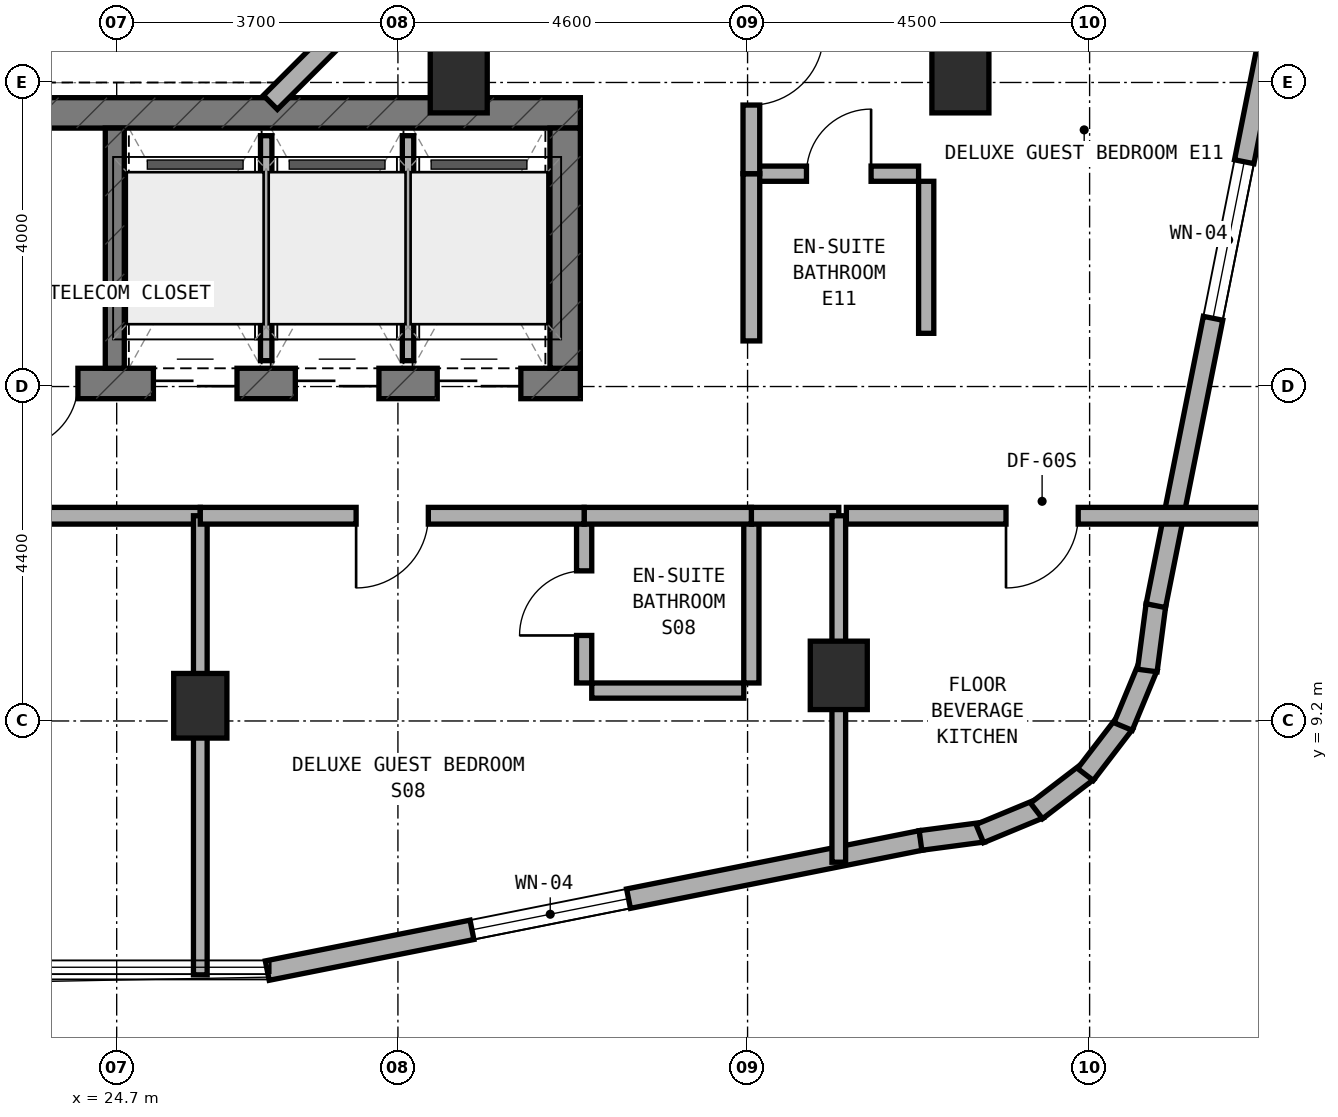
"""IFC4 building model, lengths in metres.
Left out: names, types, materials, properties, quantities, classifications, styles, units other than length and angle.
Written with IfcOpenShell. Run it as: python <this file> out.ifc"""

import sys

from ifc_helpers import new_model, si_unit, direction, frame, frame_2d, origin, origin_2d, place, context, subcontext, project, spatial, rectangle, extrude, element, fill, save


model = new_model("IFC4")
c1 = context("Model", 3, precision=1e-05, world=origin(), true_north=direction((0.0, 1.0)))
c2 = subcontext(c1, "Body", "Model", "MODEL_VIEW")
j1 = project(units=[si_unit("LENGTHUNIT", "METRE"), si_unit("PLANEANGLEUNIT", "RADIAN")], contexts=[c1])
p1 = place(None, origin())
s1 = spatial("IfcSite", under=j1, at=p1, CompositionType="ELEMENT")
p2 = place(p1, origin())
s2 = spatial("IfcBuilding", under=s1, at=p2, CompositionType="ELEMENT")
p3 = place(p2, frame((0.0, 0.0, 224.3)))
s3 = spatial("IfcBuildingStorey", under=s2, at=p3, CompositionType="ELEMENT", Elevation=224.3)
p4 = place(p3, frame((6.4, 13.64, 0.0), z_axis=(0.0, 0.0, 1.0), x_axis=(1.0, 0.0, 0.0)))
e1 = element("IfcWall", 1, at=p4, inside=s3, PredefinedType="SHEAR", context=c2, shape_type="SweptSolid", body=[
    extrude(rectangle(XDim=24.4, YDim=0.4, at=frame_2d((12.2, 0.0))), origin(), (0.0, 0.0, 1.0), 3.6),
])
p5 = place(p4, frame((9.15, 0.0, 0.0)))
e2 = element("IfcOpeningElement", 2, at=p5, cuts=e1, PredefinedType="OPENING", context=c2, shape_type="SweptSolid", body=[
    extrude(rectangle(XDim=1.2, YDim=2.15, at=frame_2d((0.6, 1.075))), frame((0.0, 0.21, 0.0), z_axis=(0.0, -1.0, 0.0), x_axis=(1.0, 0.0, 0.0)), (0.0, 0.0, 1.0), 0.42),
])
p6 = place(p4, frame((16.94, 0.0, 0.0)))
e3 = element("IfcOpeningElement", 3, at=p6, cuts=e1, PredefinedType="OPENING", context=c2, shape_type="SweptSolid", body=[
    extrude(rectangle(XDim=0.85, YDim=2.1, at=frame_2d((0.425, 1.05))), frame((0.0, 0.21, 0.0), z_axis=(0.0, -1.0, 0.0), x_axis=(1.0, 0.0, 0.0)), (0.0, 0.0, 1.0), 0.42),
])
p7 = place(p4, frame((18.783, 0.0, 0.0)))
e4 = element("IfcOpeningElement", 4, at=p7, cuts=e1, PredefinedType="OPENING", context=c2, shape_type="SweptSolid", body=[
    extrude(rectangle(XDim=1.1, YDim=2.15, at=frame_2d((0.55, 1.075))), frame((0.0, 0.21, 0.0), z_axis=(0.0, -1.0, 0.0), x_axis=(1.0, 0.0, 0.0)), (0.0, 0.0, 1.0), 0.42),
])
p8 = place(p4, frame((20.65, 0.0, 0.0)))
e5 = element("IfcOpeningElement", 5, at=p8, cuts=e1, PredefinedType="OPENING", context=c2, shape_type="SweptSolid", body=[
    extrude(rectangle(XDim=1.1, YDim=2.15, at=frame_2d((0.55, 1.075))), frame((0.0, 0.21, 0.0), z_axis=(0.0, -1.0, 0.0), x_axis=(1.0, 0.0, 0.0)), (0.0, 0.0, 1.0), 0.42),
])
p9 = place(p4, frame((22.517, 0.0, 0.0)))
e6 = element("IfcOpeningElement", 6, at=p9, cuts=e1, PredefinedType="OPENING", context=c2, shape_type="SweptSolid", body=[
    extrude(rectangle(XDim=1.1, YDim=2.15, at=frame_2d((0.55, 1.075))), frame((0.0, 0.21, 0.0), z_axis=(0.0, -1.0, 0.0), x_axis=(1.0, 0.0, 0.0)), (0.0, 0.0, 1.0), 0.42),
])
p10 = place(p3, frame((6.4, 17.2, 0.0), z_axis=(0.0, 0.0, 1.0), x_axis=(1.0, 0.0, 0.0)))
e7 = element("IfcWall", 7, at=p10, inside=s3, PredefinedType="SHEAR", context=c2, shape_type="SweptSolid", body=[
    extrude(rectangle(XDim=24.4, YDim=0.4, at=frame_2d((12.2, 0.0))), origin(), (0.0, 0.0, 1.0), 3.6),
])
p11 = place(p3, frame((30.6, 13.84, 0.0), z_axis=(0.0, 0.0, 1.0), x_axis=(0.0, 1.0, 0.0)))
e8 = element("IfcWall", 8, at=p11, inside=s3, PredefinedType="SHEAR", context=c2, shape_type="SweptSolid", body=[
    extrude(rectangle(XDim=3.16, YDim=0.4, at=frame_2d((1.58, 0.0))), origin(), (0.0, 0.0, 1.0), 3.6),
])
p12 = place(p3, frame((24.675, 13.84, 0.0), z_axis=(0.0, 0.0, 1.0), x_axis=(0.0, 1.0, 0.0)))
e9 = element("IfcWall", 9, at=p12, inside=s3, PredefinedType="STANDARD", context=c2, shape_type="SweptSolid", body=[
    extrude(rectangle(XDim=3.16, YDim=0.25, at=frame_2d((1.58, 0.0))), origin(), (0.0, 0.0, 1.0), 3.32),
])
p13 = place(p3, frame((25.8, 9.4, 0.0), z_axis=(0.0, 0.0, 1.0), x_axis=(1.0, 0.0, 0.0)))
e10 = element("IfcColumn", 10, at=p13, inside=s3, PredefinedType="COLUMN", context=c2, shape_type="SweptSolid", body=[
    extrude(rectangle(XDim=0.7, YDim=0.85, at=origin_2d()), origin(), (0.0, 0.0, 1.0), 3.6),
])
for number, where, z_axis, x_axis in (
    (11, (34.2, 9.8, 0.0), (0.0, 0.0, 1.0), (1.0, 0.0, 0.0)),
    (12, (35.8, 17.65, 0.0), (0.0, 0.0, 1.0), (1.0, 0.0, 0.0)),
    (13, (29.2, 17.65, 0.0), (0.0, 0.0, 1.0), (1.0, 0.0, 0.0)),
):
    element("IfcColumn", number, at=place(p3, frame(where, z_axis=z_axis, x_axis=x_axis)), inside=s3, PredefinedType="COLUMN", context=c2, shape_type="SweptSolid", body=[
        extrude(rectangle(XDim=0.75, YDim=0.9, at=origin_2d()), origin(), (0.0, 0.0, 1.0), 3.6),
    ])
p14 = place(p3, frame((26.681, 5.916, 0.0), z_axis=(0.0, 0.0, 1.0), x_axis=(0.980745199176, 0.195291715883, 0.0)))
e14 = element("IfcWall", 14, at=p14, inside=s3, PredefinedType="STANDARD", context=c2, shape_type="SweptSolid", body=[
    extrude(rectangle(XDim=8.771, YDim=0.26, at=frame_2d((4.385, 0.0))), origin(), (0.0, 0.0, 1.0), 3.32),
])
p15 = place(p14, frame((2.746, 0.0, 0.85)))
e15 = element("IfcOpeningElement", 15, at=p15, cuts=e14, PredefinedType="OPENING", context=c2, shape_type="SweptSolid", body=[
    extrude(rectangle(XDim=2.1, YDim=1.5, at=frame_2d((1.05, 0.75))), frame((0.0, 0.14, 0.0), z_axis=(0.0, -1.0, 0.0), x_axis=(1.0, 0.0, 0.0)), (0.0, 0.0, 1.0), 0.28),
])
p16 = place(p3, frame((35.275, 7.628, 0.0), z_axis=(0.0, 0.0, 1.0), x_axis=(0.9913883573, 0.130954667764, 0.0)))
e16 = element("IfcWall", 16, at=p16, inside=s3, PredefinedType="STANDARD", context=c2, shape_type="SweptSolid", body=[
    extrude(rectangle(XDim=0.833, YDim=0.26, at=frame_2d((0.417, 0.0))), origin(), (0.0, 0.0, 1.0), 3.32),
])
p17 = place(p3, frame((36.055, 7.719, 0.0), z_axis=(0.0, 0.0, 1.0), x_axis=(0.923754491172, 0.382985169477, 0.0)))
e17 = element("IfcWall", 17, at=p17, inside=s3, PredefinedType="STANDARD", context=c2, shape_type="SweptSolid", body=[
    extrude(rectangle(XDim=0.851, YDim=0.26, at=frame_2d((0.426, 0.0))), origin(), (0.0, 0.0, 1.0), 3.32),
])
for number, where, z_axis, x_axis in (
    (18, (36.801, 8.017, 0.0), (0.0, 0.0, 1.0), (0.794, 0.608, 0.0)),
    (19, (37.445, 8.496, 0.0), (0.0, 0.0, 1.0), (0.608, 0.794, 0.0)),
):
    element("IfcWall", number, at=place(p3, frame(where, z_axis=z_axis, x_axis=x_axis)), inside=s3, PredefinedType="STANDARD", context=c2, shape_type="SweptSolid", body=[
        extrude(rectangle(XDim=0.85, YDim=0.26, at=frame_2d((0.425, 0.0))), origin(), (0.0, 0.0, 1.0), 3.32),
    ])
p18 = place(p3, frame((37.941, 9.127, 0.0), z_axis=(0.0, 0.0, 1.0), x_axis=(0.383229930484, 0.923652976167, 0.0)))
e20 = element("IfcWall", 20, at=p18, inside=s3, PredefinedType="STANDARD", context=c2, shape_type="SweptSolid", body=[
    extrude(rectangle(XDim=0.851, YDim=0.26, at=frame_2d((0.426, 0.0))), origin(), (0.0, 0.0, 1.0), 3.32),
])
p19 = place(p3, frame((38.259, 9.864, 0.0), z_axis=(0.0, 0.0, 1.0), x_axis=(0.130156359936, 0.991493480548, 0.0)))
e21 = element("IfcWall", 21, at=p19, inside=s3, PredefinedType="STANDARD", context=c2, shape_type="SweptSolid", body=[
    extrude(rectangle(XDim=0.868, YDim=0.26, at=frame_2d((0.434, 0.0))), origin(), (0.0, 0.0, 1.0), 3.32),
])
p20 = place(p3, frame((38.371, 10.717, 0.0), z_axis=(0.0, 0.0, 1.0), x_axis=(0.195291715883, 0.980745199176, 0.0)))
e22 = element("IfcWall", 22, at=p20, inside=s3, PredefinedType="STANDARD", context=c2, shape_type="SweptSolid", body=[
    extrude(rectangle(XDim=8.771, YDim=0.26, at=frame_2d((4.385, 0.0))), origin(), (0.0, 0.0, 1.0), 3.32),
])
p21 = place(p20, frame((3.855, 0.0, 0.85)))
e23 = element("IfcOpeningElement", 23, at=p21, cuts=e22, PredefinedType="OPENING", context=c2, shape_type="SweptSolid", body=[
    extrude(rectangle(XDim=2.1, YDim=1.5, at=frame_2d((1.05, 0.75))), frame((0.0, 0.14, 0.0), z_axis=(0.0, -1.0, 0.0), x_axis=(1.0, 0.0, 0.0)), (0.0, 0.0, 1.0), 0.28),
])
p22 = place(p3, frame((26.722, 17.338, 0.0), z_axis=(0.0, 0.0, 1.0), x_axis=(0.707059717605, 0.707153841636, 0.0)))
e24 = element("IfcWall", 24, at=p22, inside=s3, PredefinedType="STANDARD", context=c2, shape_type="SweptSolid", body=[
    extrude(rectangle(XDim=2.594, YDim=0.26, at=frame_2d((1.297, 0.0))), origin(), (0.0, 0.0, 1.0), 3.32),
])
p23 = place(p3, frame((26.667, 13.94, 0.0), z_axis=(0.0, 0.0, 1.0), x_axis=(0.0, 1.0, 0.0)))
e25 = element("IfcWall", 25, at=p23, inside=s3, PredefinedType="PARTITIONING", context=c2, shape_type="SweptSolid", body=[
    extrude(rectangle(XDim=2.96, YDim=0.15, at=frame_2d((1.48, 0.0))), origin(), (0.0, 0.0, 1.0), 3.32),
])
p24 = place(p3, frame((28.533, 13.94, 0.0), z_axis=(0.0, 0.0, 1.0), x_axis=(0.0, 1.0, 0.0)))
e26 = element("IfcWall", 26, at=p24, inside=s3, PredefinedType="PARTITIONING", context=c2, shape_type="SweptSolid", body=[
    extrude(rectangle(XDim=2.96, YDim=0.15, at=frame_2d((1.48, 0.0))), origin(), (0.0, 0.0, 1.0), 2.695),
])
p25 = place(p3, frame((18.4, 11.9, 0.0), z_axis=(0.0, 0.0, 1.0), x_axis=(1.0, 0.0, 0.0)))
e27 = element("IfcWall", 27, at=p25, inside=s3, PredefinedType="SOLIDWALL", context=c2, shape_type="SweptSolid", body=[
    extrude(rectangle(XDim=7.4, YDim=0.22, at=frame_2d((3.7, 0.0))), origin(), (0.0, 0.0, 1.0), 2.695),
])
p26 = place(p25, frame((3.225, 0.0, 0.0)))
e28 = element("IfcOpeningElement", 28, at=p26, cuts=e27, PredefinedType="OPENING", context=c2, shape_type="SweptSolid", body=[
    extrude(rectangle(XDim=0.95, YDim=2.1, at=frame_2d((0.475, 1.05))), frame((0.0, 0.12, 0.0), z_axis=(0.0, -1.0, 0.0), x_axis=(1.0, 0.0, 0.0)), (0.0, 0.0, 1.0), 0.24),
])
p27 = place(p3, frame((25.8, 5.86, 0.0), z_axis=(0.0, 0.0, 1.0), x_axis=(0.0, 1.0, 0.0)))
e29 = element("IfcWall", 29, at=p27, inside=s3, PredefinedType="SOLIDWALL", context=c2, shape_type="SweptSolid", body=[
    extrude(rectangle(XDim=6.04, YDim=0.18, at=frame_2d((3.02, 0.0))), origin(), (0.0, 0.0, 1.0), 2.695),
])
p28 = place(p3, frame((30.85, 9.7, 0.0), z_axis=(0.0, 0.0, 1.0), x_axis=(0.0, 1.0, 0.0)))
e30 = element("IfcWall", 30, at=p28, inside=s3, PredefinedType="PLUMBINGWALL", context=c2, shape_type="SweptSolid", body=[
    extrude(rectangle(XDim=2.1, YDim=0.2, at=frame_2d((1.05, 0.0))), origin(), (0.0, 0.0, 1.0), 3.015),
])
p29 = place(p28, frame((0.625, 0.0, 0.0)))
e31 = element("IfcOpeningElement", 31, at=p29, cuts=e30, PredefinedType="OPENING", context=c2, shape_type="SweptSolid", body=[
    extrude(rectangle(XDim=0.85, YDim=2.1, at=frame_2d((0.425, 1.05))), frame((0.0, 0.11, 0.0), z_axis=(0.0, -1.0, 0.0), x_axis=(1.0, 0.0, 0.0)), (0.0, 0.0, 1.0), 0.22),
])
p30 = place(p3, frame((30.95, 9.6, 0.0), z_axis=(0.0, 0.0, 1.0), x_axis=(1.0, 0.0, 0.0)))
e32 = element("IfcWall", 32, at=p30, inside=s3, PredefinedType="PLUMBINGWALL", context=c2, shape_type="SweptSolid", body=[
    extrude(rectangle(XDim=2.0, YDim=0.2, at=frame_2d((1.0, 0.0))), origin(), (0.0, 0.0, 1.0), 3.015),
])
p31 = place(p3, frame((33.05, 9.7, 0.0), z_axis=(0.0, 0.0, 1.0), x_axis=(0.0, 1.0, 0.0)))
e33 = element("IfcWall", 33, at=p31, inside=s3, PredefinedType="PLUMBINGWALL", context=c2, shape_type="SweptSolid", body=[
    extrude(rectangle(XDim=2.1, YDim=0.2, at=frame_2d((1.05, 0.0))), origin(), (0.0, 0.0, 1.0), 3.015),
])
p32 = place(p3, frame((33.05, 11.9, 0.0), z_axis=(0.0, 0.0, 1.0), x_axis=(1.0, 0.0, 0.0)))
e34 = element("IfcWall", 34, at=p32, inside=s3, PredefinedType="SOLIDWALL", context=c2, shape_type="SweptSolid", body=[
    extrude(rectangle(XDim=1.15, YDim=0.22, at=frame_2d((0.575, 0.0))), origin(), (0.0, 0.0, 1.0), 2.695),
])
p33 = place(p3, frame((30.85, 11.9, 0.0), z_axis=(0.0, 0.0, 1.0), x_axis=(1.0, 0.0, 0.0)))
e35 = element("IfcWall", 35, at=p33, inside=s3, PredefinedType="SOLIDWALL", context=c2, shape_type="SweptSolid", body=[
    extrude(rectangle(XDim=2.2, YDim=0.22, at=frame_2d((1.1, 0.0))), origin(), (0.0, 0.0, 1.0), 3.32),
])
p34 = place(p3, frame((25.8, 11.9, 0.0), z_axis=(0.0, 0.0, 1.0), x_axis=(1.0, 0.0, 0.0)))
e36 = element("IfcWall", 36, at=p34, inside=s3, PredefinedType="SOLIDWALL", context=c2, shape_type="SweptSolid", body=[
    extrude(rectangle(XDim=5.05, YDim=0.22, at=frame_2d((2.525, 0.0))), origin(), (0.0, 0.0, 1.0), 2.695),
])
p35 = place(p34, frame((2.05, 0.0, 0.0)))
e37 = element("IfcOpeningElement", 37, at=p35, cuts=e36, PredefinedType="OPENING", context=c2, shape_type="SweptSolid", body=[
    extrude(rectangle(XDim=0.95, YDim=2.1, at=frame_2d((0.475, 1.05))), frame((0.0, 0.12, 0.0), z_axis=(0.0, -1.0, 0.0), x_axis=(1.0, 0.0, 0.0)), (0.0, 0.0, 1.0), 0.24),
])
p36 = place(p3, frame((34.2, 7.342, 0.0), z_axis=(0.0, 0.0, 1.0), x_axis=(0.0, 1.0, 0.0)))
e38 = element("IfcWall", 38, at=p36, inside=s3, PredefinedType="SOLIDWALL", context=c2, shape_type="SweptSolid", body=[
    extrude(rectangle(XDim=4.558, YDim=0.18, at=frame_2d((2.279, 0.0))), origin(), (0.0, 0.0, 1.0), 2.695),
])
p37 = place(p3, frame((34.3, 11.9, 0.0), z_axis=(0.0, 0.0, 1.0), x_axis=(1.0, 0.0, 0.0)))
e39 = element("IfcWall", 39, at=p37, inside=s3, PredefinedType="SOLIDWALL", context=c2, shape_type="SweptSolid", body=[
    extrude(rectangle(XDim=5.64, YDim=0.22, at=frame_2d((2.82, 0.0))), origin(), (0.0, 0.0, 1.0), 3.015),
])
p38 = place(p37, frame((2.1, 0.0, 0.0)))
e40 = element("IfcOpeningElement", 40, at=p38, cuts=e39, PredefinedType="OPENING", context=c2, shape_type="SweptSolid", body=[
    extrude(rectangle(XDim=0.95, YDim=2.1, at=frame_2d((0.475, 1.05))), frame((0.0, 0.12, 0.0), z_axis=(0.0, -1.0, 0.0), x_axis=(1.0, 0.0, 0.0)), (0.0, 0.0, 1.0), 0.24),
])
p39 = place(p3, frame((33.15, 16.4, 0.0), z_axis=(0.0, 0.0, 1.0), x_axis=(1.0, 0.0, 0.0)))
e41 = element("IfcWall", 41, at=p39, inside=s3, PredefinedType="PLUMBINGWALL", context=c2, shape_type="SweptSolid", body=[
    extrude(rectangle(XDim=2.1, YDim=0.2, at=frame_2d((1.05, 0.0))), origin(), (0.0, 0.0, 1.0), 3.32),
])
p40 = place(p39, frame((0.625, 0.0, 0.0)))
e42 = element("IfcOpeningElement", 42, at=p40, cuts=e41, PredefinedType="OPENING", context=c2, shape_type="SweptSolid", body=[
    extrude(rectangle(XDim=0.85, YDim=2.1, at=frame_2d((0.425, 1.05))), frame((0.0, 0.11, 0.0), z_axis=(0.0, -1.0, 0.0), x_axis=(1.0, 0.0, 0.0)), (0.0, 0.0, 1.0), 0.22),
])
p41 = place(p3, frame((35.35, 14.3, 0.0), z_axis=(0.0, 0.0, 1.0), x_axis=(0.0, 1.0, 0.0)))
e43 = element("IfcWall", 43, at=p41, inside=s3, PredefinedType="PLUMBINGWALL", context=c2, shape_type="SweptSolid", body=[
    extrude(rectangle(XDim=2.0, YDim=0.2, at=frame_2d((1.0, 0.0))), origin(), (0.0, 0.0, 1.0), 3.015),
])
p42 = place(p3, frame((33.05, 14.2, 0.0), z_axis=(0.0, 0.0, 1.0), x_axis=(0.0, 1.0, 0.0)))
e44 = element("IfcWall", 44, at=p42, inside=s3, PredefinedType="SOLIDWALL", context=c2, shape_type="SweptSolid", body=[
    extrude(rectangle(XDim=2.2, YDim=0.22, at=frame_2d((1.1, 0.0))), origin(), (0.0, 0.0, 1.0), 3.32),
])
p43 = place(p3, frame((33.05, 16.4, 0.0), z_axis=(0.0, 0.0, 1.0), x_axis=(0.0, 1.0, 0.0)))
e45 = element("IfcWall", 45, at=p43, inside=s3, PredefinedType="SOLIDWALL", context=c2, shape_type="SweptSolid", body=[
    extrude(rectangle(XDim=2.756, YDim=0.22, at=frame_2d((1.378, 0.0))), origin(), (0.0, 0.0, 1.0), 2.695),
])
p44 = place(p43, frame((0.903, 0.0, 0.0)))
e46 = element("IfcOpeningElement", 46, at=p44, cuts=e45, PredefinedType="OPENING", context=c2, shape_type="SweptSolid", body=[
    extrude(rectangle(XDim=0.95, YDim=2.1, at=frame_2d((0.475, 1.05))), frame((0.0, 0.12, 0.0), z_axis=(0.0, -1.0, 0.0), x_axis=(1.0, 0.0, 0.0)), (0.0, 0.0, 1.0), 0.24),
])
p45 = place(p15, origin())
e47 = element("IfcWindow", 47, at=p45, inside=s3, PartitioningType="SINGLE_PANEL", PredefinedType="WINDOW", context=c2, shape_type="SweptSolid", body=[
    extrude(rectangle(XDim=2.1, YDim=1.5, at=frame_2d((1.05, 0.75))), frame((0.0, 0.03, 0.0), z_axis=(0.0, -1.0, 0.0), x_axis=(1.0, 0.0, 0.0)), (0.0, 0.0, 1.0), 0.06),
])
fill(e15, e47)
p46 = place(p21, origin())
e48 = element("IfcWindow", 48, at=p46, inside=s3, PartitioningType="SINGLE_PANEL", PredefinedType="WINDOW", context=c2, shape_type="SweptSolid", body=[
    extrude(rectangle(XDim=2.1, YDim=1.5, at=frame_2d((1.05, 0.75))), frame((0.0, 0.03, 0.0), z_axis=(0.0, -1.0, 0.0), x_axis=(1.0, 0.0, 0.0)), (0.0, 0.0, 1.0), 0.06),
])
fill(e23, e48)
p47 = place(p6, frame((0.85, 0.0, 0.0), z_axis=(0.0, 0.0, 1.0), x_axis=(-1.0, 0.0, 0.0)))
e49 = element("IfcDoor", 49, at=p47, inside=s3, OperationType="SINGLE_SWING_RIGHT", PredefinedType="DOOR", context=c2, shape_type="SweptSolid", body=[
    extrude(rectangle(XDim=0.85, YDim=2.1, at=frame_2d((0.425, 1.05))), frame((0.0, 0.025, 0.0), z_axis=(0.0, -1.0, 0.0), x_axis=(1.0, 0.0, 0.0)), (0.0, 0.0, 1.0), 0.05),
])
fill(e3, e49)
p48 = place(p7, frame((1.1, 0.0, 0.0), z_axis=(0.0, 0.0, 1.0), x_axis=(-1.0, 0.0, 0.0)))
e50 = element("IfcDoor", 50, at=p48, inside=s3, OperationType="DOUBLE_DOOR_SLIDING", PredefinedType="DOOR", context=c2, shape_type="SweptSolid", body=[
    extrude(rectangle(XDim=1.1, YDim=2.15, at=frame_2d((0.55, 1.075))), frame((0.0, 0.025, 0.0), z_axis=(0.0, -1.0, 0.0), x_axis=(1.0, 0.0, 0.0)), (0.0, 0.0, 1.0), 0.05),
])
fill(e4, e50)
p49 = place(p8, frame((1.1, 0.0, 0.0), z_axis=(0.0, 0.0, 1.0), x_axis=(-1.0, 0.0, 0.0)))
e51 = element("IfcDoor", 51, at=p49, inside=s3, OperationType="DOUBLE_DOOR_SLIDING", PredefinedType="DOOR", context=c2, shape_type="SweptSolid", body=[
    extrude(rectangle(XDim=1.1, YDim=2.15, at=frame_2d((0.55, 1.075))), frame((0.0, 0.025, 0.0), z_axis=(0.0, -1.0, 0.0), x_axis=(1.0, 0.0, 0.0)), (0.0, 0.0, 1.0), 0.05),
])
fill(e5, e51)
p50 = place(p9, frame((1.1, 0.0, 0.0), z_axis=(0.0, 0.0, 1.0), x_axis=(-1.0, 0.0, 0.0)))
e52 = element("IfcDoor", 52, at=p50, inside=s3, OperationType="DOUBLE_DOOR_SLIDING", PredefinedType="DOOR", context=c2, shape_type="SweptSolid", body=[
    extrude(rectangle(XDim=1.1, YDim=2.15, at=frame_2d((0.55, 1.075))), frame((0.0, 0.025, 0.0), z_axis=(0.0, -1.0, 0.0), x_axis=(1.0, 0.0, 0.0)), (0.0, 0.0, 1.0), 0.05),
])
fill(e6, e52)
p51 = place(p29, origin())
e53 = element("IfcDoor", 53, at=p51, inside=s3, OperationType="SINGLE_SWING_LEFT", PredefinedType="DOOR", context=c2, shape_type="SweptSolid", body=[
    extrude(rectangle(XDim=0.85, YDim=2.1, at=frame_2d((0.425, 1.05))), frame((0.0, 0.025, 0.0), z_axis=(0.0, -1.0, 0.0), x_axis=(1.0, 0.0, 0.0)), (0.0, 0.0, 1.0), 0.05),
])
fill(e31, e53)
p52 = place(p35, frame((0.95, 0.0, 0.0), z_axis=(0.0, 0.0, 1.0), x_axis=(-1.0, 0.0, 0.0)))
e54 = element("IfcDoor", 54, at=p52, inside=s3, OperationType="SINGLE_SWING_RIGHT", PredefinedType="DOOR", context=c2, shape_type="SweptSolid", body=[
    extrude(rectangle(XDim=0.95, YDim=2.1, at=frame_2d((0.475, 1.05))), frame((0.0, 0.025, 0.0), z_axis=(0.0, -1.0, 0.0), x_axis=(1.0, 0.0, 0.0)), (0.0, 0.0, 1.0), 0.05),
])
fill(e37, e54)
p53 = place(p38, frame((0.95, 0.0, 0.0), z_axis=(0.0, 0.0, 1.0), x_axis=(-1.0, 0.0, 0.0)))
e55 = element("IfcDoor", 55, at=p53, inside=s3, OperationType="SINGLE_SWING_RIGHT", PredefinedType="DOOR", context=c2, shape_type="SweptSolid", body=[
    extrude(rectangle(XDim=0.95, YDim=2.1, at=frame_2d((0.475, 1.05))), frame((0.0, 0.025, 0.0), z_axis=(0.0, -1.0, 0.0), x_axis=(1.0, 0.0, 0.0)), (0.0, 0.0, 1.0), 0.05),
])
fill(e40, e55)
p54 = place(p40, origin())
e56 = element("IfcDoor", 56, at=p54, inside=s3, OperationType="SINGLE_SWING_RIGHT", PredefinedType="DOOR", context=c2, shape_type="SweptSolid", body=[
    extrude(rectangle(XDim=0.85, YDim=2.1, at=frame_2d((0.425, 1.05))), frame((0.0, 0.025, 0.0), z_axis=(0.0, -1.0, 0.0), x_axis=(1.0, 0.0, 0.0)), (0.0, 0.0, 1.0), 0.05),
])
fill(e42, e56)
p55 = place(p44, frame((0.95, 0.0, 0.0), z_axis=(0.0, 0.0, 1.0), x_axis=(-1.0, 0.0, 0.0)))
e57 = element("IfcDoor", 57, at=p55, inside=s3, OperationType="SINGLE_SWING_LEFT", PredefinedType="DOOR", context=c2, shape_type="SweptSolid", body=[
    extrude(rectangle(XDim=0.95, YDim=2.1, at=frame_2d((0.475, 1.05))), frame((0.0, 0.025, 0.0), z_axis=(0.0, -1.0, 0.0), x_axis=(1.0, 0.0, 0.0)), (0.0, 0.0, 1.0), 0.05),
])
fill(e46, e57)
save(model, sys.argv[1])
